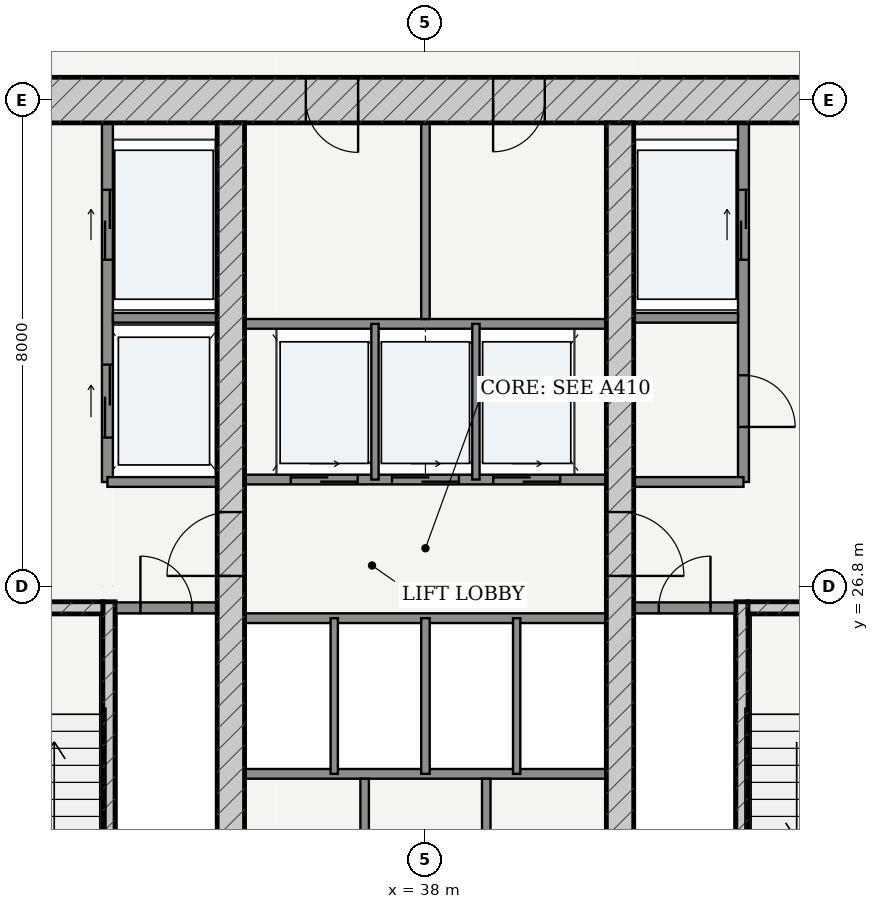
"""IFC4 building model, lengths in metres.
Left out: names, types, materials, properties, quantities, classifications, styles, units other than length and angle.
Written with IfcOpenShell. Run it as: python <this file> out.ifc"""

import sys

from ifc_helpers import new_model, si_unit, direction, frame, frame_2d, origin, place, context, subcontext, project, spatial, rectangle, extrude, source, transform, mapped, element, fill, save


model = new_model("IFC4")
c1 = context("Model", 3, precision=1e-05, world=origin(), true_north=direction((-0.2419218956, 0.970295726276)))
c2 = subcontext(c1, "Body", "Model", "MODEL_VIEW")
j1 = project(units=[si_unit("LENGTHUNIT", "METRE"), si_unit("PLANEANGLEUNIT", "RADIAN")], contexts=[c1])
p1 = place(None, origin())
s1 = spatial("IfcSite", under=j1, at=p1, CompositionType="ELEMENT")
p2 = place(p1, origin())
s2 = spatial("IfcBuilding", under=s1, at=p2, CompositionType="ELEMENT")
p3 = place(p2, frame((0.0, 0.0, 38.4)))
s3 = spatial("IfcBuildingStorey", under=s2, at=p3, CompositionType="ELEMENT", Elevation=38.4)
p4 = place(p3, frame((28.625, 34.8, 0.0), z_axis=(0.0, 0.0, 1.0), x_axis=(1.0, 0.0, 0.0)))
e1 = element("IfcWall", 1, at=p4, inside=s3, PredefinedType="SHEAR", context=c2, shape_type="SweptSolid", body=[
    extrude(rectangle(XDim=18.75, YDim=0.75, at=frame_2d((9.375, 0.0))), origin(), (0.0, 0.0, 1.0), 3.32),
])
p5 = place(p4, frame((7.407, 0.0, 0.0)))
e2 = element("IfcOpeningElement", 2, at=p5, cuts=e1, PredefinedType="OPENING", context=c2, shape_type="SweptSolid", body=[
    extrude(rectangle(XDim=0.86, YDim=2.1, at=frame_2d((0.43, 1.05))), frame((0.0, 0.385, 0.0), z_axis=(0.0, -1.0, 0.0), x_axis=(1.0, 0.0, 0.0)), (0.0, 0.0, 1.0), 0.77),
])
p6 = place(p4, frame((10.488, 0.0, 0.0)))
e3 = element("IfcOpeningElement", 3, at=p6, cuts=e1, PredefinedType="OPENING", context=c2, shape_type="SweptSolid", body=[
    extrude(rectangle(XDim=0.85, YDim=2.1, at=frame_2d((0.425, 1.05))), frame((0.0, 0.385, 0.0), z_axis=(0.0, -1.0, 0.0), x_axis=(1.0, 0.0, 0.0)), (0.0, 0.0, 1.0), 0.77),
])
p7 = place(p3, frame((32.795, 19.175, 0.0), z_axis=(0.0, 0.0, 1.0), x_axis=(0.0, 1.0, 0.0)))
e4 = element("IfcWall", 4, at=p7, inside=s3, PredefinedType="SOLIDWALL", context=c2, shape_type="SweptSolid", body=[
    extrude(rectangle(XDim=7.375, YDim=0.2, at=frame_2d((3.688, 0.0))), origin(), (0.0, 0.0, 1.0), 3.32),
])
p8 = place(p3, frame((29.375, 26.45, 0.0), z_axis=(0.0, 0.0, 1.0), x_axis=(1.0, 0.0, 0.0)))
e5 = element("IfcWall", 5, at=p8, inside=s3, PredefinedType="SOLIDWALL", context=c2, shape_type="SweptSolid", body=[
    extrude(rectangle(XDim=3.32, YDim=0.2, at=frame_2d((1.66, 0.0))), origin(), (0.0, 0.0, 1.0), 3.32),
])
p9 = place(p8, frame((1.185, 0.0, 0.0)))
e6 = element("IfcOpeningElement", 6, at=p9, cuts=e5, PredefinedType="OPENING", context=c2, shape_type="SweptSolid", body=[
    extrude(rectangle(XDim=0.95, YDim=2.15, at=frame_2d((0.475, 1.075))), frame((0.0, 0.11, 0.0), z_axis=(0.0, -1.0, 0.0), x_axis=(1.0, 0.0, 0.0)), (0.0, 0.0, 1.0), 0.22),
])
p10 = place(p3, frame((43.205, 19.175, 0.0), z_axis=(0.0, 0.0, 1.0), x_axis=(0.0, 1.0, 0.0)))
e7 = element("IfcWall", 7, at=p10, inside=s3, PredefinedType="SOLIDWALL", context=c2, shape_type="SweptSolid", body=[
    extrude(rectangle(XDim=7.375, YDim=0.2, at=frame_2d((3.688, 0.0))), origin(), (0.0, 0.0, 1.0), 3.32),
])
p11 = place(p3, frame((43.305, 26.45, 0.0), z_axis=(0.0, 0.0, 1.0), x_axis=(1.0, 0.0, 0.0)))
e8 = element("IfcWall", 8, at=p11, inside=s3, PredefinedType="SOLIDWALL", context=c2, shape_type="SweptSolid", body=[
    extrude(rectangle(XDim=3.32, YDim=0.2, at=frame_2d((1.66, 0.0))), origin(), (0.0, 0.0, 1.0), 3.32),
])
p12 = place(p11, frame((1.185, 0.0, 0.0)))
e9 = element("IfcOpeningElement", 9, at=p12, cuts=e8, PredefinedType="OPENING", context=c2, shape_type="SweptSolid", body=[
    extrude(rectangle(XDim=0.95, YDim=2.15, at=frame_2d((0.475, 1.075))), frame((0.0, 0.11, 0.0), z_axis=(0.0, -1.0, 0.0), x_axis=(1.0, 0.0, 0.0)), (0.0, 0.0, 1.0), 0.22),
])
p13 = place(p3, frame((34.8, 19.175, 0.0), z_axis=(0.0, 0.0, 1.0), x_axis=(0.0, 1.0, 0.0)))
e10 = element("IfcWall", 10, at=p13, inside=s3, PredefinedType="SHEAR", context=c2, shape_type="SweptSolid", body=[
    extrude(rectangle(XDim=15.25, YDim=0.45, at=frame_2d((7.625, 0.0))), origin(), (0.0, 0.0, 1.0), 3.32),
])
p14 = place(p13, frame((7.8, 0.0, 0.0)))
e11 = element("IfcOpeningElement", 11, at=p14, cuts=e10, PredefinedType="OPENING", context=c2, shape_type="SweptSolid", body=[
    extrude(rectangle(XDim=1.05, YDim=2.15, at=frame_2d((0.525, 1.075))), frame((0.0, 0.235, 0.0), z_axis=(0.0, -1.0, 0.0), x_axis=(1.0, 0.0, 0.0)), (0.0, 0.0, 1.0), 0.47),
])
p15 = place(p3, frame((41.2, 19.175, 0.0), z_axis=(0.0, 0.0, 1.0), x_axis=(0.0, 1.0, 0.0)))
e12 = element("IfcWall", 12, at=p15, inside=s3, PredefinedType="SHEAR", context=c2, shape_type="SweptSolid", body=[
    extrude(rectangle(XDim=15.25, YDim=0.45, at=frame_2d((7.625, 0.0))), origin(), (0.0, 0.0, 1.0), 3.32),
])
p16 = place(p15, frame((7.8, 0.0, 0.0)))
e13 = element("IfcOpeningElement", 13, at=p16, cuts=e12, PredefinedType="OPENING", context=c2, shape_type="SweptSolid", body=[
    extrude(rectangle(XDim=1.05, YDim=2.15, at=frame_2d((0.525, 1.075))), frame((0.0, 0.235, 0.0), z_axis=(0.0, -1.0, 0.0), x_axis=(1.0, 0.0, 0.0)), (0.0, 0.0, 1.0), 0.47),
])
p17 = place(p3, frame((32.9, 26.45, 0.0), z_axis=(0.0, 0.0, 1.0), x_axis=(1.0, 0.0, 0.0)))
e14 = element("IfcWall", 14, at=p17, inside=s3, PredefinedType="PARTITIONING", context=c2, shape_type="SweptSolid", body=[
    extrude(rectangle(XDim=1.675, YDim=0.18, at=frame_2d((0.837, 0.0))), origin(), (0.0, 0.0, 1.0), 3.32),
])
p18 = place(p17, frame((0.413, 0.0, 0.0)))
e15 = element("IfcOpeningElement", 15, at=p18, cuts=e14, PredefinedType="OPENING", context=c2, shape_type="SweptSolid", body=[
    extrude(rectangle(XDim=0.85, YDim=2.1, at=frame_2d((0.425, 1.05))), frame((0.0, 0.1, 0.0), z_axis=(0.0, -1.0, 0.0), x_axis=(1.0, 0.0, 0.0)), (0.0, 0.0, 1.0), 0.2),
])
p19 = place(p3, frame((41.425, 26.45, 0.0), z_axis=(0.0, 0.0, 1.0), x_axis=(1.0, 0.0, 0.0)))
e16 = element("IfcWall", 16, at=p19, inside=s3, PredefinedType="PARTITIONING", context=c2, shape_type="SweptSolid", body=[
    extrude(rectangle(XDim=1.675, YDim=0.18, at=frame_2d((0.837, 0.0))), origin(), (0.0, 0.0, 1.0), 3.32),
])
p20 = place(p19, frame((0.413, 0.0, 0.0)))
e17 = element("IfcOpeningElement", 17, at=p20, cuts=e16, PredefinedType="OPENING", context=c2, shape_type="SweptSolid", body=[
    extrude(rectangle(XDim=0.85, YDim=2.1, at=frame_2d((0.425, 1.05))), frame((0.0, 0.1, 0.0), z_axis=(0.0, -1.0, 0.0), x_axis=(1.0, 0.0, 0.0)), (0.0, 0.0, 1.0), 0.2),
])
p21 = place(p3, frame((32.77, 28.52, 0.0), z_axis=(0.0, 0.0, 1.0), x_axis=(0.0, 1.0, 0.0)))
e18 = element("IfcWall", 18, at=p21, inside=s3, PredefinedType="PARTITIONING", context=c2, shape_type="SweptSolid", body=[
    extrude(rectangle(XDim=5.905, YDim=0.18, at=frame_2d((2.953, 0.0))), origin(), (0.0, 0.0, 1.0), 3.32),
])
p22 = place(p21, frame((3.655, 0.0, 0.0)))
e19 = element("IfcOpeningElement", 19, at=p22, cuts=e18, PredefinedType="OPENING", context=c2, shape_type="SweptSolid", body=[
    extrude(rectangle(XDim=1.15, YDim=2.2, at=frame_2d((0.575, 1.1))), frame((0.0, 0.1, 0.0), z_axis=(0.0, -1.0, 0.0), x_axis=(1.0, 0.0, 0.0)), (0.0, 0.0, 1.0), 0.2),
])
p23 = place(p21, frame((0.73, 0.0, 0.0)))
e20 = element("IfcOpeningElement", 20, at=p23, cuts=e18, PredefinedType="OPENING", context=c2, shape_type="SweptSolid", body=[
    extrude(rectangle(XDim=1.2, YDim=2.25, at=frame_2d((0.6, 1.125))), frame((0.0, 0.1, 0.0), z_axis=(0.0, -1.0, 0.0), x_axis=(1.0, 0.0, 0.0)), (0.0, 0.0, 1.0), 0.2),
])
p24 = place(p3, frame((32.86, 31.22, 0.0), z_axis=(0.0, 0.0, 1.0), x_axis=(1.0, 0.0, 0.0)))
e21 = element("IfcWall", 21, at=p24, inside=s3, PredefinedType="PARTITIONING", context=c2, shape_type="SweptSolid", body=[
    extrude(rectangle(XDim=1.715, YDim=0.16, at=frame_2d((0.857, 0.0))), origin(), (0.0, 0.0, 1.0), 3.32),
])
p25 = place(p3, frame((32.77, 28.52, 0.0), z_axis=(0.0, 0.0, 1.0), x_axis=(1.0, 0.0, 0.0)))
e22 = element("IfcWall", 22, at=p25, inside=s3, PredefinedType="PARTITIONING", context=c2, shape_type="SweptSolid", body=[
    extrude(rectangle(XDim=1.805, YDim=0.16, at=frame_2d((0.902, 0.0))), origin(), (0.0, 0.0, 1.0), 3.32),
])
p26 = place(p3, frame((43.23, 28.52, 0.0), z_axis=(0.0, 0.0, 1.0), x_axis=(0.0, 1.0, 0.0)))
e23 = element("IfcWall", 23, at=p26, inside=s3, PredefinedType="PARTITIONING", context=c2, shape_type="SweptSolid", body=[
    extrude(rectangle(XDim=5.905, YDim=0.18, at=frame_2d((2.953, 0.0))), origin(), (0.0, 0.0, 1.0), 3.32),
])
p27 = place(p26, frame((0.905, 0.0, 0.0)))
e24 = element("IfcOpeningElement", 24, at=p27, cuts=e23, PredefinedType="OPENING", context=c2, shape_type="SweptSolid", body=[
    extrude(rectangle(XDim=0.85, YDim=2.1, at=frame_2d((0.425, 1.05))), frame((0.0, 0.1, 0.0), z_axis=(0.0, -1.0, 0.0), x_axis=(1.0, 0.0, 0.0)), (0.0, 0.0, 1.0), 0.2),
])
p28 = place(p26, frame((3.655, 0.0, 0.0)))
e25 = element("IfcOpeningElement", 25, at=p28, cuts=e23, PredefinedType="OPENING", context=c2, shape_type="SweptSolid", body=[
    extrude(rectangle(XDim=1.15, YDim=2.2, at=frame_2d((0.575, 1.1))), frame((0.0, 0.1, 0.0), z_axis=(0.0, -1.0, 0.0), x_axis=(1.0, 0.0, 0.0)), (0.0, 0.0, 1.0), 0.2),
])
p29 = place(p3, frame((41.425, 31.22, 0.0), z_axis=(0.0, 0.0, 1.0), x_axis=(1.0, 0.0, 0.0)))
e26 = element("IfcWall", 26, at=p29, inside=s3, PredefinedType="PARTITIONING", context=c2, shape_type="SweptSolid", body=[
    extrude(rectangle(XDim=1.715, YDim=0.16, at=frame_2d((0.857, 0.0))), origin(), (0.0, 0.0, 1.0), 3.32),
])
p30 = place(p3, frame((41.425, 28.52, 0.0), z_axis=(0.0, 0.0, 1.0), x_axis=(1.0, 0.0, 0.0)))
e27 = element("IfcWall", 27, at=p30, inside=s3, PredefinedType="PARTITIONING", context=c2, shape_type="SweptSolid", body=[
    extrude(rectangle(XDim=1.805, YDim=0.16, at=frame_2d((0.902, 0.0))), origin(), (0.0, 0.0, 1.0), 3.32),
])
p31 = place(p3, frame((35.025, 28.56, 0.0), z_axis=(0.0, 0.0, 1.0), x_axis=(1.0, 0.0, 0.0)))
e28 = element("IfcWall", 28, at=p31, inside=s3, PredefinedType="PARTITIONING", context=c2, shape_type="SweptSolid", body=[
    extrude(rectangle(XDim=5.95, YDim=0.16, at=frame_2d((2.975, 0.0))), origin(), (0.0, 0.0, 1.0), 3.32),
])
p32 = place(p31, frame((0.76, 0.0, 0.0)))
e29 = element("IfcOpeningElement", 29, at=p32, cuts=e28, PredefinedType="OPENING", context=c2, shape_type="SweptSolid", body=[
    extrude(rectangle(XDim=1.1, YDim=2.2, at=frame_2d((0.55, 1.1))), frame((0.0, 0.09, 0.0), z_axis=(0.0, -1.0, 0.0), x_axis=(1.0, 0.0, 0.0)), (0.0, 0.0, 1.0), 0.18),
])
p33 = place(p31, frame((2.425, 0.0, 0.0)))
e30 = element("IfcOpeningElement", 30, at=p33, cuts=e28, PredefinedType="OPENING", context=c2, shape_type="SweptSolid", body=[
    extrude(rectangle(XDim=1.1, YDim=2.2, at=frame_2d((0.55, 1.1))), frame((0.0, 0.09, 0.0), z_axis=(0.0, -1.0, 0.0), x_axis=(1.0, 0.0, 0.0)), (0.0, 0.0, 1.0), 0.18),
])
p34 = place(p31, frame((4.09, 0.0, 0.0)))
e31 = element("IfcOpeningElement", 31, at=p34, cuts=e28, PredefinedType="OPENING", context=c2, shape_type="SweptSolid", body=[
    extrude(rectangle(XDim=1.1, YDim=2.2, at=frame_2d((0.55, 1.1))), frame((0.0, 0.09, 0.0), z_axis=(0.0, -1.0, 0.0), x_axis=(1.0, 0.0, 0.0)), (0.0, 0.0, 1.0), 0.18),
])
p35 = place(p3, frame((35.025, 31.12, 0.0), z_axis=(0.0, 0.0, 1.0), x_axis=(1.0, 0.0, 0.0)))
e32 = element("IfcWall", 32, at=p35, inside=s3, PredefinedType="PARTITIONING", context=c2, shape_type="SweptSolid", body=[
    extrude(rectangle(XDim=5.95, YDim=0.16, at=frame_2d((2.975, 0.0))), origin(), (0.0, 0.0, 1.0), 3.32),
])
for number, where, z_axis, x_axis in (
    (33, (37.17, 28.56, 0.0), (0.0, 0.0, 1.0), (0.0, 1.0, 0.0)),
    (34, (38.83, 28.56, 0.0), (0.0, 0.0, 1.0), (0.0, 1.0, 0.0)),
):
    element("IfcWall", number, at=place(p3, frame(where, z_axis=z_axis, x_axis=x_axis)), inside=s3, PredefinedType="PARTITIONING", context=c2, shape_type="SweptSolid", body=[
        extrude(rectangle(XDim=2.56, YDim=0.12, at=frame_2d((1.28, 0.0))), origin(), (0.0, 0.0, 1.0), 3.32),
    ])
p36 = place(p3, frame((38.0, 31.2, 0.0), z_axis=(0.0, 0.0, 1.0), x_axis=(0.0, 1.0, 0.0)))
e35 = element("IfcWall", 35, at=p36, inside=s3, PredefinedType="PARTITIONING", context=c2, shape_type="SweptSolid", body=[
    extrude(rectangle(XDim=3.225, YDim=0.14, at=frame_2d((1.613, 0.0))), origin(), (0.0, 0.0, 1.0), 3.32),
])
for number, where, z_axis, x_axis in (
    (36, (35.025, 26.28, 0.0), (0.0, 0.0, 1.0), (1.0, 0.0, 0.0)),
    (37, (35.025, 23.72, 0.0), (0.0, 0.0, 1.0), (1.0, 0.0, 0.0)),
):
    element("IfcWall", number, at=place(p3, frame(where, z_axis=z_axis, x_axis=x_axis)), inside=s3, PredefinedType="PARTITIONING", context=c2, shape_type="SweptSolid", body=[
        extrude(rectangle(XDim=5.95, YDim=0.16, at=frame_2d((2.975, 0.0))), origin(), (0.0, 0.0, 1.0), 3.32),
    ])
p37 = place(p3, frame((36.5, 23.72, 0.0), z_axis=(0.0, 0.0, 1.0), x_axis=(0.0, 1.0, 0.0)))
e38 = element("IfcWall", 38, at=p37, inside=s3, PredefinedType="PARTITIONING", context=c2, shape_type="SweptSolid", body=[
    extrude(rectangle(XDim=2.56, YDim=0.12, at=frame_2d((1.28, 0.0))), origin(), (0.0, 0.0, 1.0), 3.32),
])
p38 = place(p3, frame((38.0, 23.72, 0.0), z_axis=(0.0, 0.0, 1.0), x_axis=(0.0, 1.0, 0.0)))
e39 = element("IfcWall", 39, at=p38, inside=s3, PredefinedType="PARTITIONING", context=c2, shape_type="SweptSolid", body=[
    extrude(rectangle(XDim=2.56, YDim=0.14, at=frame_2d((1.28, 0.0))), origin(), (0.0, 0.0, 1.0), 3.32),
])
p39 = place(p3, frame((39.5, 23.72, 0.0), z_axis=(0.0, 0.0, 1.0), x_axis=(0.0, 1.0, 0.0)))
e40 = element("IfcWall", 40, at=p39, inside=s3, PredefinedType="PARTITIONING", context=c2, shape_type="SweptSolid", body=[
    extrude(rectangle(XDim=2.56, YDim=0.12, at=frame_2d((1.28, 0.0))), origin(), (0.0, 0.0, 1.0), 3.32),
])
p40 = place(p3, frame((37.0, 19.175, 0.0), z_axis=(0.0, 0.0, 1.0), x_axis=(0.0, 1.0, 0.0)))
e41 = element("IfcWall", 41, at=p40, inside=s3, PredefinedType="PARTITIONING", context=c2, shape_type="SweptSolid", body=[
    extrude(rectangle(XDim=4.465, YDim=0.14, at=frame_2d((2.232, 0.0))), origin(), (0.0, 0.0, 1.0), 3.32),
])
p41 = place(p40, frame((1.808, 0.0, 0.0)))
e42 = element("IfcOpeningElement", 42, at=p41, cuts=e41, PredefinedType="OPENING", context=c2, shape_type="SweptSolid", body=[
    extrude(rectangle(XDim=0.85, YDim=2.1, at=frame_2d((0.425, 1.05))), frame((0.0, 0.08, 0.0), z_axis=(0.0, -1.0, 0.0), x_axis=(1.0, 0.0, 0.0)), (0.0, 0.0, 1.0), 0.16),
])
p42 = place(p3, frame((39.0, 19.175, 0.0), z_axis=(0.0, 0.0, 1.0), x_axis=(0.0, 1.0, 0.0)))
e43 = element("IfcWall", 43, at=p42, inside=s3, PredefinedType="PARTITIONING", context=c2, shape_type="SweptSolid", body=[
    extrude(rectangle(XDim=4.465, YDim=0.14, at=frame_2d((2.232, 0.0))), origin(), (0.0, 0.0, 1.0), 3.32),
])
p43 = place(p42, frame((1.808, 0.0, 0.0)))
e44 = element("IfcOpeningElement", 44, at=p43, cuts=e43, PredefinedType="OPENING", context=c2, shape_type="SweptSolid", body=[
    extrude(rectangle(XDim=0.85, YDim=2.1, at=frame_2d((0.425, 1.05))), frame((0.0, 0.08, 0.0), z_axis=(0.0, -1.0, 0.0), x_axis=(1.0, 0.0, 0.0)), (0.0, 0.0, 1.0), 0.16),
])
m1 = source(origin(), c2, "Body", "SweptSolid", [
    extrude(rectangle(XDim=1.05, YDim=2.15, at=frame_2d((0.525, 1.075))), frame((0.0, 0.025, 0.0), z_axis=(0.0, -1.0, 0.0), x_axis=(1.0, 0.0, 0.0)), (0.0, 0.0, 1.0), 0.05),
])
p44 = place(p14, origin())
e45 = element("IfcDoor", 45, at=p44, inside=s3, OperationType="SINGLE_SWING_LEFT", PredefinedType="DOOR", context=c2, shape_type="MappedRepresentation", body=[
    mapped(m1, transform((0.0, 0.0, 0.0), scale=1.0)),
])
fill(e11, e45)
p45 = place(p16, frame((1.05, 0.0, 0.0), z_axis=(0.0, 0.0, 1.0), x_axis=(-1.0, 0.0, 0.0)))
e46 = element("IfcDoor", 46, at=p45, inside=s3, OperationType="SINGLE_SWING_RIGHT", PredefinedType="DOOR", context=c2, shape_type="MappedRepresentation", body=[
    mapped(m1, transform((0.0, 0.0, 0.0), scale=1.0)),
])
fill(e13, e46)
m2 = source(origin(), c2, "Body", "SweptSolid", [
    extrude(rectangle(XDim=0.85, YDim=2.1, at=frame_2d((0.425, 1.05))), frame((0.0, 0.025, 0.0), z_axis=(0.0, -1.0, 0.0), x_axis=(1.0, 0.0, 0.0)), (0.0, 0.0, 1.0), 0.05),
])
p46 = place(p18, origin())
e47 = element("IfcDoor", 47, at=p46, inside=s3, OperationType="SINGLE_SWING_LEFT", PredefinedType="DOOR", context=c2, shape_type="MappedRepresentation", body=[
    mapped(m2, transform((0.0, 0.0, 0.0), scale=1.0)),
])
fill(e15, e47)
p47 = place(p20, origin())
e48 = element("IfcDoor", 48, at=p47, inside=s3, OperationType="SINGLE_SWING_RIGHT", PredefinedType="DOOR", context=c2, shape_type="MappedRepresentation", body=[
    mapped(m2, transform((0.0, 0.0, 0.0), scale=1.0)),
])
fill(e17, e48)
p48 = place(p27, frame((0.85, 0.0, 0.0), z_axis=(0.0, 0.0, 1.0), x_axis=(-1.0, 0.0, 0.0)))
e49 = element("IfcDoor", 49, at=p48, inside=s3, OperationType="SINGLE_SWING_RIGHT", PredefinedType="DOOR", context=c2, shape_type="MappedRepresentation", body=[
    mapped(m2, transform((0.0, 0.0, 0.0), scale=1.0)),
])
fill(e24, e49)
m3 = source(origin(), c2, "Body", "SweptSolid", [
    extrude(rectangle(XDim=0.86, YDim=2.1, at=frame_2d((0.43, 1.05))), frame((0.0, 0.025, 0.0), z_axis=(0.0, -1.0, 0.0), x_axis=(1.0, 0.0, 0.0)), (0.0, 0.0, 1.0), 0.05),
])
p49 = place(p5, frame((0.86, 0.0, 0.0), z_axis=(0.0, 0.0, 1.0), x_axis=(-1.0, 0.0, 0.0)))
e50 = element("IfcDoor", 50, at=p49, inside=s3, OperationType="SINGLE_SWING_LEFT", PredefinedType="DOOR", context=c2, shape_type="MappedRepresentation", body=[
    mapped(m3, transform((0.0, 0.0, 0.0), scale=1.0)),
])
fill(e2, e50)
p50 = place(p6, frame((0.85, 0.0, 0.0), z_axis=(0.0, 0.0, 1.0), x_axis=(-1.0, 0.0, 0.0)))
e51 = element("IfcDoor", 51, at=p50, inside=s3, OperationType="SINGLE_SWING_RIGHT", PredefinedType="DOOR", context=c2, shape_type="MappedRepresentation", body=[
    mapped(m2, transform((0.0, 0.0, 0.0), scale=1.0)),
])
fill(e3, e51)
m4 = source(origin(), c2, "Body", "SweptSolid", [
    extrude(rectangle(XDim=1.15, YDim=2.2, at=frame_2d((0.575, 1.1))), frame((0.0, 0.025, 0.0), z_axis=(0.0, -1.0, 0.0), x_axis=(1.0, 0.0, 0.0)), (0.0, 0.0, 1.0), 0.05),
])
p51 = place(p22, origin())
e52 = element("IfcDoor", 52, at=p51, inside=s3, OperationType="DOUBLE_DOOR_SLIDING", PredefinedType="DOOR", context=c2, shape_type="MappedRepresentation", body=[
    mapped(m4, transform((0.0, 0.0, 0.0), scale=1.0)),
])
fill(e19, e52)
p52 = place(p28, origin())
e53 = element("IfcDoor", 53, at=p52, inside=s3, OperationType="DOUBLE_DOOR_SLIDING", PredefinedType="DOOR", context=c2, shape_type="MappedRepresentation", body=[
    mapped(m4, transform((0.0, 0.0, 0.0), scale=1.0)),
])
fill(e25, e53)
m5 = source(origin(), c2, "Body", "SweptSolid", [
    extrude(rectangle(XDim=1.2, YDim=2.25, at=frame_2d((0.6, 1.125))), frame((0.0, 0.025, 0.0), z_axis=(0.0, -1.0, 0.0), x_axis=(1.0, 0.0, 0.0)), (0.0, 0.0, 1.0), 0.05),
])
p53 = place(p23, origin())
e54 = element("IfcDoor", 54, at=p53, inside=s3, OperationType="DOUBLE_DOOR_SLIDING", PredefinedType="DOOR", context=c2, shape_type="MappedRepresentation", body=[
    mapped(m5, transform((0.0, 0.0, 0.0), scale=1.0)),
])
fill(e20, e54)
m6 = source(origin(), c2, "Body", "SweptSolid", [
    extrude(rectangle(XDim=1.1, YDim=2.2, at=frame_2d((0.55, 1.1))), frame((0.0, 0.025, 0.0), z_axis=(0.0, -1.0, 0.0), x_axis=(1.0, 0.0, 0.0)), (0.0, 0.0, 1.0), 0.05),
])
p54 = place(p32, origin())
e55 = element("IfcDoor", 55, at=p54, inside=s3, OperationType="DOUBLE_DOOR_SLIDING", PredefinedType="DOOR", context=c2, shape_type="MappedRepresentation", body=[
    mapped(m6, transform((0.0, 0.0, 0.0), scale=1.0)),
])
fill(e29, e55)
p55 = place(p33, origin())
e56 = element("IfcDoor", 56, at=p55, inside=s3, OperationType="DOUBLE_DOOR_SLIDING", PredefinedType="DOOR", context=c2, shape_type="MappedRepresentation", body=[
    mapped(m6, transform((0.0, 0.0, 0.0), scale=1.0)),
])
fill(e30, e56)
p56 = place(p34, origin())
e57 = element("IfcDoor", 57, at=p56, inside=s3, OperationType="DOUBLE_DOOR_SLIDING", PredefinedType="DOOR", context=c2, shape_type="MappedRepresentation", body=[
    mapped(m6, transform((0.0, 0.0, 0.0), scale=1.0)),
])
fill(e31, e57)
save(model, sys.argv[1])
